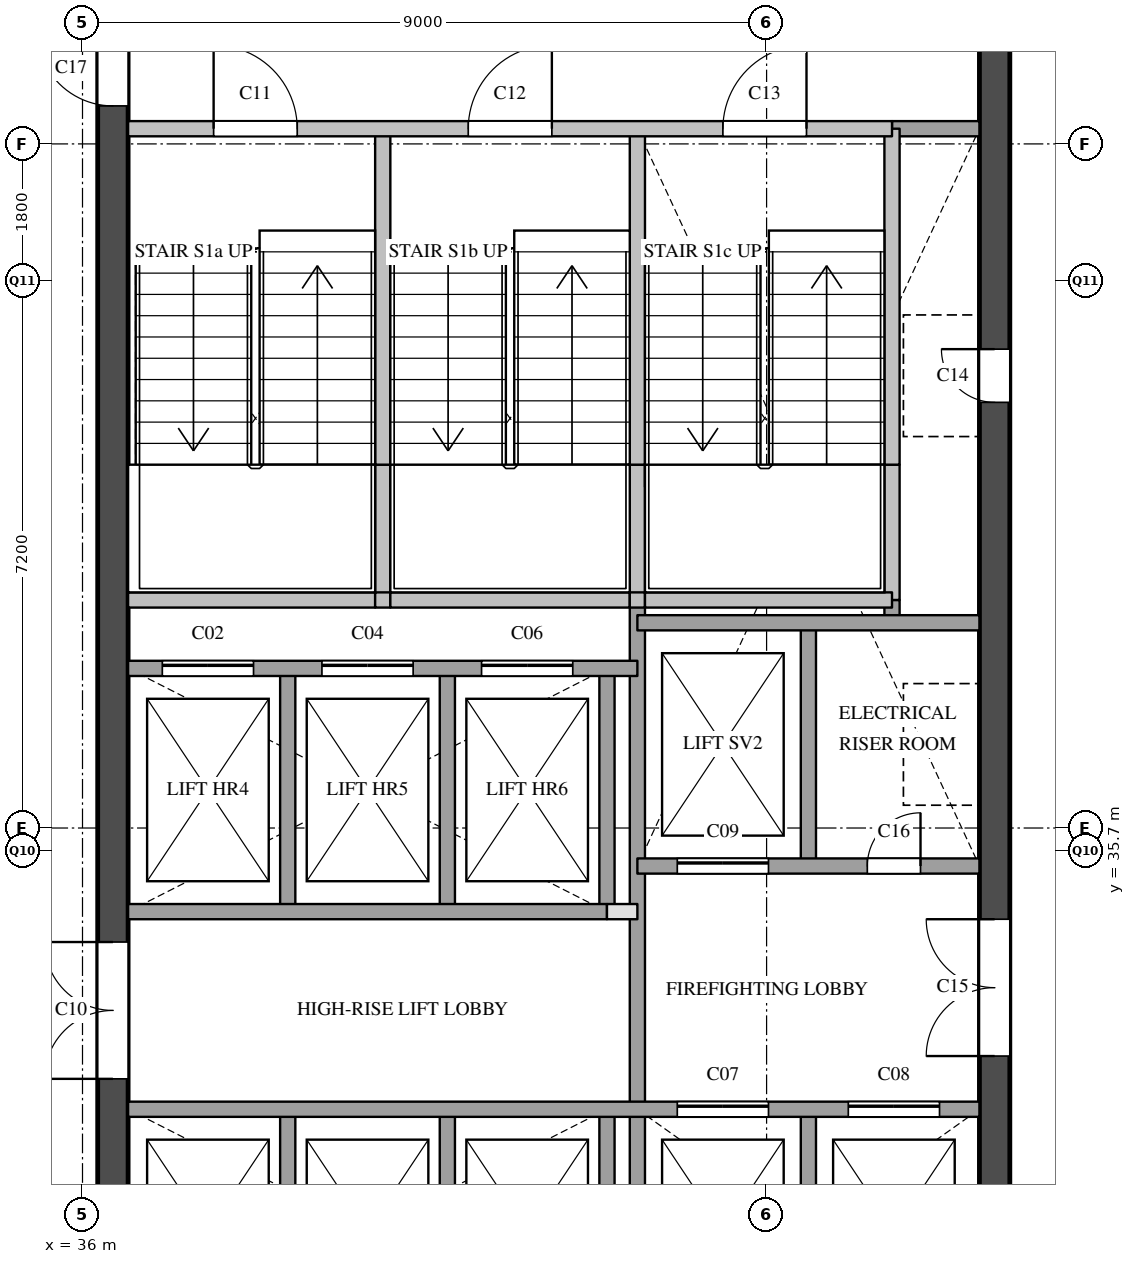
"""IFC4 building model, lengths in metres.
Left out: names, types, materials, properties, quantities, classifications, styles, units other than length and angle.
Written with IfcOpenShell. Run it as: python <this file> out.ifc"""

import sys

from ifc_helpers import new_model, si_unit, direction, frame, frame_2d, origin, place, context, subcontext, project, spatial, rectangle, extrude, element, fill, save


model = new_model("IFC4")
c1 = context("Model", 3, precision=1e-05, world=origin(), true_north=direction((0.0, 1.0)))
c2 = subcontext(c1, "Body", "Model", "MODEL_VIEW")
j1 = project(units=[si_unit("LENGTHUNIT", "METRE"), si_unit("PLANEANGLEUNIT", "RADIAN")], contexts=[c1])
p1 = place(None, origin())
s1 = spatial("IfcSite", under=j1, at=p1, CompositionType="ELEMENT")
p2 = place(p1, origin())
s2 = spatial("IfcBuilding", under=s1, at=p2, CompositionType="ELEMENT")
p3 = place(p2, frame((0.0, 0.0, 254.0)))
s3 = spatial("IfcBuildingStorey", under=s2, at=p3, CompositionType="ELEMENT", Elevation=254.0)
p4 = place(p3, frame((36.4, 29.1, 0.0), z_axis=(0.0, 0.0, 1.0), x_axis=(0.0, 1.0, 0.0)))
e1 = element("IfcWall", 1, at=p4, inside=s3, PredefinedType="SHEAR", context=c2, shape_type="SweptSolid", body=[
    extrude(rectangle(XDim=20.3, YDim=0.4, at=frame_2d((10.15, 0.0))), origin(), (0.0, 0.0, 1.0), 3.6),
])
p5 = place(p4, frame((3.6, 0.0, 0.0)))
e2 = element("IfcOpeningElement", 2, at=p5, cuts=e1, PredefinedType="OPENING", context=c2, shape_type="SweptSolid", body=[
    extrude(rectangle(XDim=1.8, YDim=2.1, at=frame_2d((0.9, 1.05))), frame((0.0, 0.21, 0.0), z_axis=(0.0, -1.0, 0.0), x_axis=(1.0, 0.0, 0.0)), (0.0, 0.0, 1.0), 0.42),
])
p6 = place(p4, frame((16.4, 0.0, 0.0)))
e3 = element("IfcOpeningElement", 3, at=p6, cuts=e1, PredefinedType="OPENING", context=c2, shape_type="SweptSolid", body=[
    extrude(rectangle(XDim=1.0, YDim=2.1, at=frame_2d((0.5, 1.05))), frame((0.0, 0.21, 0.0), z_axis=(0.0, -1.0, 0.0), x_axis=(1.0, 0.0, 0.0)), (0.0, 0.0, 1.0), 0.42),
])
p7 = place(p3, frame((48.0, 29.1, 0.0), z_axis=(0.0, 0.0, 1.0), x_axis=(0.0, 1.0, 0.0)))
e4 = element("IfcWall", 4, at=p7, inside=s3, PredefinedType="SHEAR", context=c2, shape_type="SweptSolid", body=[
    extrude(rectangle(XDim=20.3, YDim=0.4, at=frame_2d((10.15, 0.0))), origin(), (0.0, 0.0, 1.0), 3.6),
])
p8 = place(p7, frame((12.5, 0.0, 0.0)))
e5 = element("IfcOpeningElement", 5, at=p8, cuts=e4, PredefinedType="OPENING", context=c2, shape_type="SweptSolid", body=[
    extrude(rectangle(XDim=0.7, YDim=2.1, at=frame_2d((0.35, 1.05))), frame((0.0, 0.21, 0.0), z_axis=(0.0, -1.0, 0.0), x_axis=(1.0, 0.0, 0.0)), (0.0, 0.0, 1.0), 0.42),
])
p9 = place(p7, frame((3.9, 0.0, 0.0)))
e6 = element("IfcOpeningElement", 6, at=p9, cuts=e4, PredefinedType="OPENING", context=c2, shape_type="SweptSolid", body=[
    extrude(rectangle(XDim=1.8, YDim=2.1, at=frame_2d((0.9, 1.05))), frame((0.0, 0.21, 0.0), z_axis=(0.0, -1.0, 0.0), x_axis=(1.0, 0.0, 0.0)), (0.0, 0.0, 1.0), 0.42),
])
p10 = place(p3, frame((38.7, 29.1, 0.0), z_axis=(0.0, 0.0, 1.0), x_axis=(0.0, 1.0, 0.0)))
e7 = element("IfcWall", 7, at=p10, inside=s3, PredefinedType="SOLIDWALL", context=c2, shape_type="SweptSolid", body=[
    extrude(rectangle(XDim=3.2, YDim=0.2, at=frame_2d((1.6, 0.0))), origin(), (0.0, 0.0, 1.0), 3.6),
])
p11 = place(p3, frame((38.7, 34.9, 0.0), z_axis=(0.0, 0.0, 1.0), x_axis=(0.0, 1.0, 0.0)))
e8 = element("IfcWall", 8, at=p11, inside=s3, PredefinedType="SOLIDWALL", context=c2, shape_type="SweptSolid", body=[
    extrude(rectangle(XDim=3.2, YDim=0.2, at=frame_2d((1.6, 0.0))), origin(), (0.0, 0.0, 1.0), 3.6),
])
p12 = place(p3, frame((39.95, 39.0, 0.0), z_axis=(0.0, 0.0, 1.0), x_axis=(0.0, 1.0, 0.0)))
e9 = element("IfcWall", 9, at=p12, inside=s3, PredefinedType="SOLIDWALL", context=c2, shape_type="SweptSolid", body=[
    extrude(rectangle(XDim=1.78, YDim=0.2, at=frame_2d((0.89, 0.0))), origin(), (0.0, 0.0, 1.0), 3.6),
])
p13 = place(p3, frame((39.95, 40.78, 0.0), z_axis=(0.0, 0.0, 1.0), x_axis=(0.0, 1.0, 0.0)))
e10 = element("IfcWall", 10, at=p13, inside=s3, PredefinedType="SOLIDWALL", context=c2, shape_type="SweptSolid", body=[
    extrude(rectangle(XDim=4.42, YDim=0.2, at=frame_2d((2.21, 0.0))), origin(), (0.0, 0.0, 1.0), 3.6),
])
p14 = place(p3, frame((40.8, 29.1, 0.0), z_axis=(0.0, 0.0, 1.0), x_axis=(0.0, 1.0, 0.0)))
e11 = element("IfcWall", 11, at=p14, inside=s3, PredefinedType="SOLIDWALL", context=c2, shape_type="SweptSolid", body=[
    extrude(rectangle(XDim=3.2, YDim=0.2, at=frame_2d((1.6, 0.0))), origin(), (0.0, 0.0, 1.0), 3.6),
])
p15 = place(p3, frame((40.8, 34.9, 0.0), z_axis=(0.0, 0.0, 1.0), x_axis=(0.0, 1.0, 0.0)))
e12 = element("IfcWall", 12, at=p15, inside=s3, PredefinedType="SOLIDWALL", context=c2, shape_type="SweptSolid", body=[
    extrude(rectangle(XDim=3.2, YDim=0.2, at=frame_2d((1.6, 0.0))), origin(), (0.0, 0.0, 1.0), 3.6),
])
p16 = place(p3, frame((42.9, 29.1, 0.0), z_axis=(0.0, 0.0, 1.0), x_axis=(0.0, 1.0, 0.0)))
e13 = element("IfcWall", 13, at=p16, inside=s3, PredefinedType="SOLIDWALL", context=c2, shape_type="SweptSolid", body=[
    extrude(rectangle(XDim=3.2, YDim=0.2, at=frame_2d((1.6, 0.0))), origin(), (0.0, 0.0, 1.0), 3.6),
])
p17 = place(p3, frame((42.9, 34.9, 0.0), z_axis=(0.0, 0.0, 1.0), x_axis=(0.0, 1.0, 0.0)))
e14 = element("IfcWall", 14, at=p17, inside=s3, PredefinedType="SOLIDWALL", context=c2, shape_type="SweptSolid", body=[
    extrude(rectangle(XDim=3.2, YDim=0.2, at=frame_2d((1.6, 0.0))), origin(), (0.0, 0.0, 1.0), 3.6),
])
p18 = place(p3, frame((43.3, 29.1, 0.0), z_axis=(0.0, 0.0, 1.0), x_axis=(0.0, 1.0, 0.0)))
e15 = element("IfcWall", 15, at=p18, inside=s3, PredefinedType="SOLIDWALL", context=c2, shape_type="SweptSolid", body=[
    extrude(rectangle(XDim=9.9, YDim=0.2, at=frame_2d((4.95, 0.0))), origin(), (0.0, 0.0, 1.0), 3.6),
])
p19 = place(p3, frame((43.3, 39.0, 0.0), z_axis=(0.0, 0.0, 1.0), x_axis=(0.0, 1.0, 0.0)))
e16 = element("IfcWall", 16, at=p19, inside=s3, PredefinedType="SOLIDWALL", context=c2, shape_type="SweptSolid", body=[
    extrude(rectangle(XDim=1.78, YDim=0.2, at=frame_2d((0.89, 0.0))), origin(), (0.0, 0.0, 1.0), 3.6),
])
p20 = place(p3, frame((43.3, 40.78, 0.0), z_axis=(0.0, 0.0, 1.0), x_axis=(0.0, 1.0, 0.0)))
e17 = element("IfcWall", 17, at=p20, inside=s3, PredefinedType="SOLIDWALL", context=c2, shape_type="SweptSolid", body=[
    extrude(rectangle(XDim=4.42, YDim=0.2, at=frame_2d((2.21, 0.0))), origin(), (0.0, 0.0, 1.0), 3.6),
])
for number, where, z_axis, x_axis in (
    (18, (45.55, 29.1, 0.0), (0.0, 0.0, 1.0), (0.0, 1.0, 0.0)),
    (19, (45.55, 35.5, 0.0), (0.0, 0.0, 1.0), (0.0, 1.0, 0.0)),
):
    element("IfcWall", number, at=place(p3, frame(where, z_axis=z_axis, x_axis=x_axis)), inside=s3, PredefinedType="SOLIDWALL", context=c2, shape_type="SweptSolid", body=[
        extrude(rectangle(XDim=3.2, YDim=0.2, at=frame_2d((1.6, 0.0))), origin(), (0.0, 0.0, 1.0), 3.6),
    ])
p21 = place(p3, frame((46.65, 38.7, 0.0), z_axis=(0.0, 0.0, 1.0), x_axis=(0.0, 1.0, 0.0)))
e20 = element("IfcWall", 20, at=p21, inside=s3, PredefinedType="SOLIDWALL", context=c2, shape_type="SweptSolid", body=[
    extrude(rectangle(XDim=0.3, YDim=0.2, at=frame_2d((0.15, 0.0))), origin(), (0.0, 0.0, 1.0), 3.6),
])
p22 = place(p3, frame((46.65, 39.0, 0.0), z_axis=(0.0, 0.0, 1.0), x_axis=(0.0, 1.0, 0.0)))
e21 = element("IfcWall", 21, at=p22, inside=s3, PredefinedType="SOLIDWALL", context=c2, shape_type="SweptSolid", body=[
    extrude(rectangle(XDim=1.78, YDim=0.2, at=frame_2d((0.89, 0.0))), origin(), (0.0, 0.0, 1.0), 3.6),
])
p23 = place(p3, frame((46.65, 40.78, 0.0), z_axis=(0.0, 0.0, 1.0), x_axis=(0.0, 1.0, 0.0)))
e22 = element("IfcWall", 22, at=p23, inside=s3, PredefinedType="SOLIDWALL", context=c2, shape_type="SweptSolid", body=[
    extrude(rectangle(XDim=4.42, YDim=0.2, at=frame_2d((2.21, 0.0))), origin(), (0.0, 0.0, 1.0), 3.6),
])
p24 = place(p3, frame((36.6, 32.3, 0.0), z_axis=(0.0, 0.0, 1.0), x_axis=(1.0, 0.0, 0.0)))
e23 = element("IfcWall", 23, at=p24, inside=s3, PredefinedType="SOLIDWALL", context=c2, shape_type="SweptSolid", body=[
    extrude(rectangle(XDim=11.2, YDim=0.2, at=frame_2d((5.6, 0.0))), origin(), (0.0, 0.0, 1.0), 3.6),
])
p25 = place(p24, frame((7.225, 0.0, 0.0)))
e24 = element("IfcOpeningElement", 24, at=p25, cuts=e23, PredefinedType="OPENING", context=c2, shape_type="SweptSolid", body=[
    extrude(rectangle(XDim=1.2, YDim=2.1, at=frame_2d((0.6, 1.05))), frame((0.0, 0.11, 0.0), z_axis=(0.0, -1.0, 0.0), x_axis=(1.0, 0.0, 0.0)), (0.0, 0.0, 1.0), 0.22),
])
p26 = place(p24, frame((9.475, 0.0, 0.0)))
e25 = element("IfcOpeningElement", 25, at=p26, cuts=e23, PredefinedType="OPENING", context=c2, shape_type="SweptSolid", body=[
    extrude(rectangle(XDim=1.2, YDim=2.1, at=frame_2d((0.6, 1.05))), frame((0.0, 0.11, 0.0), z_axis=(0.0, -1.0, 0.0), x_axis=(1.0, 0.0, 0.0)), (0.0, 0.0, 1.0), 0.22),
])
p27 = place(p3, frame((42.9, 34.9, 0.0), z_axis=(0.0, 0.0, 1.0), x_axis=(1.0, 0.0, 0.0)))
e26 = element("IfcWall", 26, at=p27, inside=s3, PredefinedType="PARTITIONING", context=c2, shape_type="SweptSolid", body=[
    extrude(rectangle(XDim=0.4, YDim=0.2, at=frame_2d((0.2, 0.0))), origin(), (0.0, 0.0, 1.0), 3.6),
])
p28 = place(p3, frame((36.6, 34.9, 0.0), z_axis=(0.0, 0.0, 1.0), x_axis=(1.0, 0.0, 0.0)))
e27 = element("IfcWall", 27, at=p28, inside=s3, PredefinedType="SOLIDWALL", context=c2, shape_type="SweptSolid", body=[
    extrude(rectangle(XDim=6.3, YDim=0.2, at=frame_2d((3.15, 0.0))), origin(), (0.0, 0.0, 1.0), 3.6),
])
p29 = place(p3, frame((43.3, 35.5, 0.0), z_axis=(0.0, 0.0, 1.0), x_axis=(1.0, 0.0, 0.0)))
e28 = element("IfcWall", 28, at=p29, inside=s3, PredefinedType="SOLIDWALL", context=c2, shape_type="SweptSolid", body=[
    extrude(rectangle(XDim=4.5, YDim=0.2, at=frame_2d((2.25, 0.0))), origin(), (0.0, 0.0, 1.0), 3.6),
])
p30 = place(p29, frame((0.525, 0.0, 0.0)))
e29 = element("IfcOpeningElement", 29, at=p30, cuts=e28, PredefinedType="OPENING", context=c2, shape_type="SweptSolid", body=[
    extrude(rectangle(XDim=1.2, YDim=2.1, at=frame_2d((0.6, 1.05))), frame((0.0, 0.11, 0.0), z_axis=(0.0, -1.0, 0.0), x_axis=(1.0, 0.0, 0.0)), (0.0, 0.0, 1.0), 0.22),
])
p31 = place(p29, frame((3.025, 0.0, 0.0)))
e30 = element("IfcOpeningElement", 30, at=p31, cuts=e28, PredefinedType="OPENING", context=c2, shape_type="SweptSolid", body=[
    extrude(rectangle(XDim=0.7, YDim=2.1, at=frame_2d((0.35, 1.05))), frame((0.0, 0.11, 0.0), z_axis=(0.0, -1.0, 0.0), x_axis=(1.0, 0.0, 0.0)), (0.0, 0.0, 1.0), 0.22),
])
p32 = place(p3, frame((36.6, 38.1, 0.0), z_axis=(0.0, 0.0, 1.0), x_axis=(1.0, 0.0, 0.0)))
e31 = element("IfcWall", 31, at=p32, inside=s3, PredefinedType="SOLIDWALL", context=c2, shape_type="SweptSolid", body=[
    extrude(rectangle(XDim=6.7, YDim=0.2, at=frame_2d((3.35, 0.0))), origin(), (0.0, 0.0, 1.0), 3.6),
])
p33 = place(p32, frame((0.45, 0.0, 0.0)))
e32 = element("IfcOpeningElement", 32, at=p33, cuts=e31, PredefinedType="OPENING", context=c2, shape_type="SweptSolid", body=[
    extrude(rectangle(XDim=1.2, YDim=2.1, at=frame_2d((0.6, 1.05))), frame((0.0, 0.11, 0.0), z_axis=(0.0, -1.0, 0.0), x_axis=(1.0, 0.0, 0.0)), (0.0, 0.0, 1.0), 0.22),
])
p34 = place(p32, frame((2.55, 0.0, 0.0)))
e33 = element("IfcOpeningElement", 33, at=p34, cuts=e31, PredefinedType="OPENING", context=c2, shape_type="SweptSolid", body=[
    extrude(rectangle(XDim=1.2, YDim=2.1, at=frame_2d((0.6, 1.05))), frame((0.0, 0.11, 0.0), z_axis=(0.0, -1.0, 0.0), x_axis=(1.0, 0.0, 0.0)), (0.0, 0.0, 1.0), 0.22),
])
p35 = place(p32, frame((4.65, 0.0, 0.0)))
e34 = element("IfcOpeningElement", 34, at=p35, cuts=e31, PredefinedType="OPENING", context=c2, shape_type="SweptSolid", body=[
    extrude(rectangle(XDim=1.2, YDim=2.1, at=frame_2d((0.6, 1.05))), frame((0.0, 0.11, 0.0), z_axis=(0.0, -1.0, 0.0), x_axis=(1.0, 0.0, 0.0)), (0.0, 0.0, 1.0), 0.22),
])
p36 = place(p3, frame((43.3, 38.7, 0.0), z_axis=(0.0, 0.0, 1.0), x_axis=(1.0, 0.0, 0.0)))
e35 = element("IfcWall", 35, at=p36, inside=s3, PredefinedType="SOLIDWALL", context=c2, shape_type="SweptSolid", body=[
    extrude(rectangle(XDim=4.5, YDim=0.2, at=frame_2d((2.25, 0.0))), origin(), (0.0, 0.0, 1.0), 3.6),
])
p37 = place(p3, frame((36.6, 39.0, 0.0), z_axis=(0.0, 0.0, 1.0), x_axis=(1.0, 0.0, 0.0)))
e36 = element("IfcWall", 36, at=p37, inside=s3, PredefinedType="SOLIDWALL", context=c2, shape_type="SweptSolid", body=[
    extrude(rectangle(XDim=3.25, YDim=0.2, at=frame_2d((1.625, 0.0))), origin(), (0.0, 0.0, 1.0), 3.6),
])
p38 = place(p3, frame((39.85, 39.0, 0.0), z_axis=(0.0, 0.0, 1.0), x_axis=(1.0, 0.0, 0.0)))
e37 = element("IfcWall", 37, at=p38, inside=s3, PredefinedType="SOLIDWALL", context=c2, shape_type="SweptSolid", body=[
    extrude(rectangle(XDim=0.2, YDim=0.2, at=frame_2d((0.1, 0.0))), origin(), (0.0, 0.0, 1.0), 3.6),
])
p39 = place(p3, frame((40.05, 39.0, 0.0), z_axis=(0.0, 0.0, 1.0), x_axis=(1.0, 0.0, 0.0)))
e38 = element("IfcWall", 38, at=p39, inside=s3, PredefinedType="SOLIDWALL", context=c2, shape_type="SweptSolid", body=[
    extrude(rectangle(XDim=3.15, YDim=0.2, at=frame_2d((1.575, 0.0))), origin(), (0.0, 0.0, 1.0), 3.6),
])
p40 = place(p3, frame((43.2, 39.0, 0.0), z_axis=(0.0, 0.0, 1.0), x_axis=(1.0, 0.0, 0.0)))
e39 = element("IfcWall", 39, at=p40, inside=s3, PredefinedType="SOLIDWALL", context=c2, shape_type="SweptSolid", body=[
    extrude(rectangle(XDim=0.2, YDim=0.2, at=frame_2d((0.1, 0.0))), origin(), (0.0, 0.0, 1.0), 3.6),
])
p41 = place(p3, frame((43.4, 39.0, 0.0), z_axis=(0.0, 0.0, 1.0), x_axis=(1.0, 0.0, 0.0)))
e40 = element("IfcWall", 40, at=p41, inside=s3, PredefinedType="SOLIDWALL", context=c2, shape_type="SweptSolid", body=[
    extrude(rectangle(XDim=3.25, YDim=0.2, at=frame_2d((1.625, 0.0))), origin(), (0.0, 0.0, 1.0), 3.6),
])
p42 = place(p3, frame((46.65, 45.2, 0.0), z_axis=(0.0, 0.0, 1.0), x_axis=(1.0, 0.0, 0.0)))
e41 = element("IfcWall", 41, at=p42, inside=s3, PredefinedType="SOLIDWALL", context=c2, shape_type="SweptSolid", body=[
    extrude(rectangle(XDim=1.15, YDim=0.2, at=frame_2d((0.575, 0.0))), origin(), (0.0, 0.0, 1.0), 3.6),
])
p43 = place(p3, frame((36.6, 45.2, 0.0), z_axis=(0.0, 0.0, 1.0), x_axis=(1.0, 0.0, 0.0)))
e42 = element("IfcWall", 42, at=p43, inside=s3, PredefinedType="SOLIDWALL", context=c2, shape_type="SweptSolid", body=[
    extrude(rectangle(XDim=10.05, YDim=0.2, at=frame_2d((5.025, 0.0))), origin(), (0.0, 0.0, 1.0), 3.6),
])
p44 = place(p43, frame((1.125, 0.0, 0.0)))
e43 = element("IfcOpeningElement", 43, at=p44, cuts=e42, PredefinedType="OPENING", context=c2, shape_type="SweptSolid", body=[
    extrude(rectangle(XDim=1.1, YDim=2.1, at=frame_2d((0.55, 1.05))), frame((0.0, 0.11, 0.0), z_axis=(0.0, -1.0, 0.0), x_axis=(1.0, 0.0, 0.0)), (0.0, 0.0, 1.0), 0.22),
])
p45 = place(p43, frame((4.475, 0.0, 0.0)))
e44 = element("IfcOpeningElement", 44, at=p45, cuts=e42, PredefinedType="OPENING", context=c2, shape_type="SweptSolid", body=[
    extrude(rectangle(XDim=1.1, YDim=2.1, at=frame_2d((0.55, 1.05))), frame((0.0, 0.11, 0.0), z_axis=(0.0, -1.0, 0.0), x_axis=(1.0, 0.0, 0.0)), (0.0, 0.0, 1.0), 0.22),
])
p46 = place(p43, frame((7.825, 0.0, 0.0)))
e45 = element("IfcOpeningElement", 45, at=p46, cuts=e42, PredefinedType="OPENING", context=c2, shape_type="SweptSolid", body=[
    extrude(rectangle(XDim=1.1, YDim=2.1, at=frame_2d((0.55, 1.05))), frame((0.0, 0.11, 0.0), z_axis=(0.0, -1.0, 0.0), x_axis=(1.0, 0.0, 0.0)), (0.0, 0.0, 1.0), 0.22),
])
p47 = place(p33, origin())
e46 = element("IfcDoor", 46, at=p47, inside=s3, OperationType="SLIDING_TO_LEFT", PredefinedType="DOOR", context=c2, shape_type="SweptSolid", body=[
    extrude(rectangle(XDim=1.2, YDim=2.1, at=frame_2d((0.6, 1.05))), frame((0.0, 0.025, 0.0), z_axis=(0.0, -1.0, 0.0), x_axis=(1.0, 0.0, 0.0)), (0.0, 0.0, 1.0), 0.05),
])
fill(e32, e46)
p48 = place(p34, origin())
e47 = element("IfcDoor", 47, at=p48, inside=s3, OperationType="SLIDING_TO_LEFT", PredefinedType="DOOR", context=c2, shape_type="SweptSolid", body=[
    extrude(rectangle(XDim=1.2, YDim=2.1, at=frame_2d((0.6, 1.05))), frame((0.0, 0.025, 0.0), z_axis=(0.0, -1.0, 0.0), x_axis=(1.0, 0.0, 0.0)), (0.0, 0.0, 1.0), 0.05),
])
fill(e33, e47)
p49 = place(p35, origin())
e48 = element("IfcDoor", 48, at=p49, inside=s3, OperationType="SLIDING_TO_LEFT", PredefinedType="DOOR", context=c2, shape_type="SweptSolid", body=[
    extrude(rectangle(XDim=1.2, YDim=2.1, at=frame_2d((0.6, 1.05))), frame((0.0, 0.025, 0.0), z_axis=(0.0, -1.0, 0.0), x_axis=(1.0, 0.0, 0.0)), (0.0, 0.0, 1.0), 0.05),
])
fill(e34, e48)
p50 = place(p25, origin())
e49 = element("IfcDoor", 49, at=p50, inside=s3, OperationType="SLIDING_TO_LEFT", PredefinedType="DOOR", context=c2, shape_type="SweptSolid", body=[
    extrude(rectangle(XDim=1.2, YDim=2.1, at=frame_2d((0.6, 1.05))), frame((0.0, 0.025, 0.0), z_axis=(0.0, -1.0, 0.0), x_axis=(1.0, 0.0, 0.0)), (0.0, 0.0, 1.0), 0.05),
])
fill(e24, e49)
p51 = place(p26, origin())
e50 = element("IfcDoor", 50, at=p51, inside=s3, OperationType="SLIDING_TO_LEFT", PredefinedType="DOOR", context=c2, shape_type="SweptSolid", body=[
    extrude(rectangle(XDim=1.2, YDim=2.1, at=frame_2d((0.6, 1.05))), frame((0.0, 0.025, 0.0), z_axis=(0.0, -1.0, 0.0), x_axis=(1.0, 0.0, 0.0)), (0.0, 0.0, 1.0), 0.05),
])
fill(e25, e50)
p52 = place(p30, origin())
e51 = element("IfcDoor", 51, at=p52, inside=s3, OperationType="SLIDING_TO_LEFT", PredefinedType="DOOR", context=c2, shape_type="SweptSolid", body=[
    extrude(rectangle(XDim=1.2, YDim=2.1, at=frame_2d((0.6, 1.05))), frame((0.0, 0.025, 0.0), z_axis=(0.0, -1.0, 0.0), x_axis=(1.0, 0.0, 0.0)), (0.0, 0.0, 1.0), 0.05),
])
fill(e29, e51)
p53 = place(p5, origin())
e52 = element("IfcDoor", 52, at=p53, inside=s3, OperationType="DOUBLE_DOOR_SINGLE_SWING", PredefinedType="DOOR", context=c2, shape_type="SweptSolid", body=[
    extrude(rectangle(XDim=1.8, YDim=2.1, at=frame_2d((0.9, 1.05))), frame((0.0, 0.025, 0.0), z_axis=(0.0, -1.0, 0.0), x_axis=(1.0, 0.0, 0.0)), (0.0, 0.0, 1.0), 0.05),
])
fill(e2, e52)
p54 = place(p44, origin())
e53 = element("IfcDoor", 53, at=p54, inside=s3, OperationType="SINGLE_SWING_LEFT", PredefinedType="DOOR", context=c2, shape_type="SweptSolid", body=[
    extrude(rectangle(XDim=1.1, YDim=2.1, at=frame_2d((0.55, 1.05))), frame((0.0, 0.025, 0.0), z_axis=(0.0, -1.0, 0.0), x_axis=(1.0, 0.0, 0.0)), (0.0, 0.0, 1.0), 0.05),
])
fill(e43, e53)
p55 = place(p45, origin())
e54 = element("IfcDoor", 54, at=p55, inside=s3, OperationType="SINGLE_SWING_RIGHT", PredefinedType="DOOR", context=c2, shape_type="SweptSolid", body=[
    extrude(rectangle(XDim=1.1, YDim=2.1, at=frame_2d((0.55, 1.05))), frame((0.0, 0.025, 0.0), z_axis=(0.0, -1.0, 0.0), x_axis=(1.0, 0.0, 0.0)), (0.0, 0.0, 1.0), 0.05),
])
fill(e44, e54)
p56 = place(p46, origin())
e55 = element("IfcDoor", 55, at=p56, inside=s3, OperationType="SINGLE_SWING_RIGHT", PredefinedType="DOOR", context=c2, shape_type="SweptSolid", body=[
    extrude(rectangle(XDim=1.1, YDim=2.1, at=frame_2d((0.55, 1.05))), frame((0.0, 0.025, 0.0), z_axis=(0.0, -1.0, 0.0), x_axis=(1.0, 0.0, 0.0)), (0.0, 0.0, 1.0), 0.05),
])
fill(e45, e55)
p57 = place(p8, origin())
e56 = element("IfcDoor", 56, at=p57, inside=s3, OperationType="SINGLE_SWING_RIGHT", PredefinedType="DOOR", context=c2, shape_type="SweptSolid", body=[
    extrude(rectangle(XDim=0.7, YDim=2.1, at=frame_2d((0.35, 1.05))), frame((0.0, 0.025, 0.0), z_axis=(0.0, -1.0, 0.0), x_axis=(1.0, 0.0, 0.0)), (0.0, 0.0, 1.0), 0.05),
])
fill(e5, e56)
p58 = place(p9, origin())
e57 = element("IfcDoor", 57, at=p58, inside=s3, OperationType="DOUBLE_DOOR_SINGLE_SWING", PredefinedType="DOOR", context=c2, shape_type="SweptSolid", body=[
    extrude(rectangle(XDim=1.8, YDim=2.1, at=frame_2d((0.9, 1.05))), frame((0.0, 0.025, 0.0), z_axis=(0.0, -1.0, 0.0), x_axis=(1.0, 0.0, 0.0)), (0.0, 0.0, 1.0), 0.05),
])
fill(e6, e57)
p59 = place(p31, origin())
e58 = element("IfcDoor", 58, at=p59, inside=s3, OperationType="SINGLE_SWING_RIGHT", PredefinedType="DOOR", context=c2, shape_type="SweptSolid", body=[
    extrude(rectangle(XDim=0.7, YDim=2.1, at=frame_2d((0.35, 1.05))), frame((0.0, 0.025, 0.0), z_axis=(0.0, -1.0, 0.0), x_axis=(1.0, 0.0, 0.0)), (0.0, 0.0, 1.0), 0.05),
])
fill(e30, e58)
p60 = place(p6, origin())
e59 = element("IfcDoor", 59, at=p60, inside=s3, OperationType="SINGLE_SWING_RIGHT", PredefinedType="DOOR", context=c2, shape_type="SweptSolid", body=[
    extrude(rectangle(XDim=1.0, YDim=2.1, at=frame_2d((0.5, 1.05))), frame((0.0, 0.025, 0.0), z_axis=(0.0, -1.0, 0.0), x_axis=(1.0, 0.0, 0.0)), (0.0, 0.0, 1.0), 0.05),
])
fill(e3, e59)
save(model, sys.argv[1])
